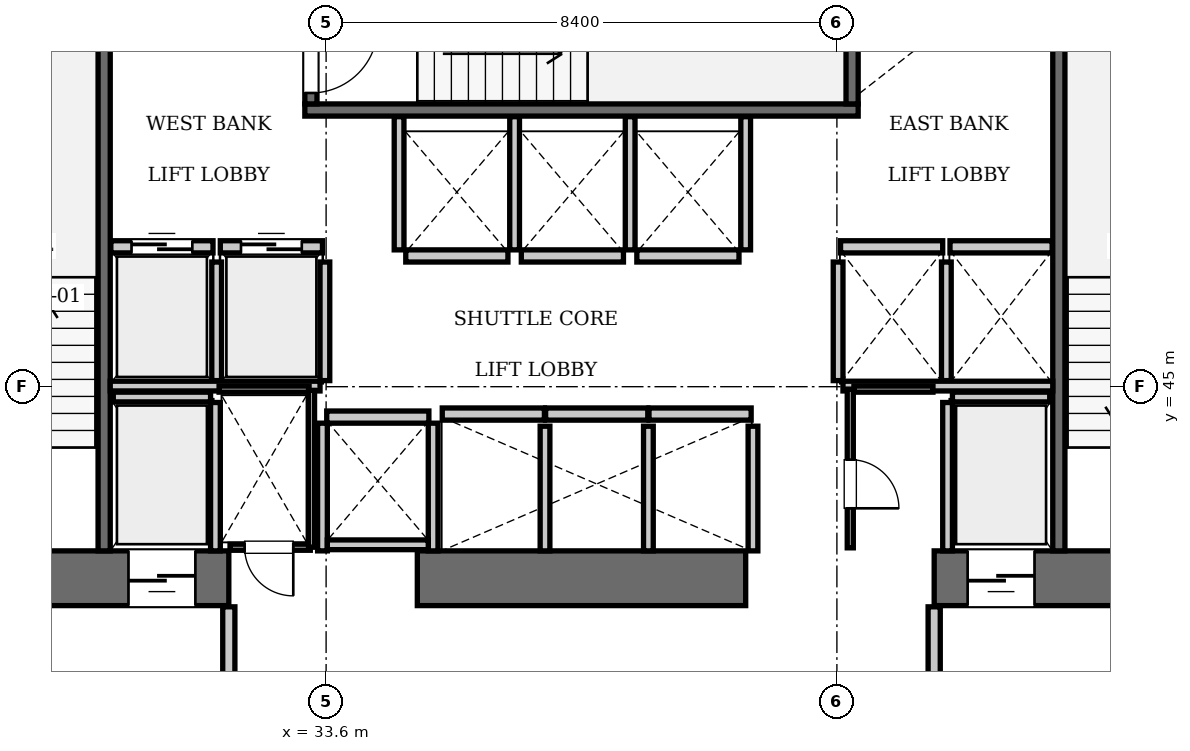
"""IFC4 building model, lengths in metres.
Left out: names, types, materials, properties, quantities, classifications, styles, units other than length and angle.
Written with IfcOpenShell. Run it as: python <this file> out.ifc"""

import sys

from ifc_helpers import new_model, si_unit, direction, frame, frame_2d, origin, place, context, subcontext, project, spatial, rectangle, extrude, element, fill, save


model = new_model("IFC4")
c1 = context("Model", 3, precision=1e-05, world=origin(), true_north=direction((0.0, 1.0)))
c2 = subcontext(c1, "Body", "Model", "MODEL_VIEW")
j1 = project(units=[si_unit("LENGTHUNIT", "METRE"), si_unit("PLANEANGLEUNIT", "RADIAN")], contexts=[c1])
p1 = place(None, origin())
s1 = spatial("IfcSite", under=j1, at=p1, CompositionType="ELEMENT")
p2 = place(p1, origin())
s2 = spatial("IfcBuilding", under=s1, at=p2, CompositionType="ELEMENT")
p3 = place(p2, frame((0.0, 0.0, 57.75)))
s3 = spatial("IfcBuildingStorey", under=s2, at=p3, CompositionType="ELEMENT", Elevation=57.75)
p4 = place(p3, frame((25.2, 41.85, 0.0), z_axis=(0.0, 0.0, 1.0), x_axis=(1.0, 0.0, 0.0)))
e1 = element("IfcWall", 1, at=p4, inside=s3, PredefinedType="SHEAR", context=c2, shape_type="SweptSolid", body=[
    extrude(rectangle(XDim=6.8, YDim=0.9, at=frame_2d((3.4, 0.0))), origin(), (0.0, 0.0, 1.0), 3.85),
])
p5 = place(p4, frame((1.65, 0.0, 0.0)))
e2 = element("IfcOpeningElement", 2, at=p5, cuts=e1, PredefinedType="OPENING", context=c2, shape_type="SweptSolid", body=[
    extrude(rectangle(XDim=1.15, YDim=2.15, at=frame_2d((0.575, 1.075))), frame((0.0, 0.46, 0.0), z_axis=(0.0, -1.0, 0.0), x_axis=(1.0, 0.0, 0.0)), (0.0, 0.0, 1.0), 0.92),
])
p6 = place(p4, frame((5.15, 0.0, 0.0)))
e3 = element("IfcOpeningElement", 3, at=p6, cuts=e1, PredefinedType="OPENING", context=c2, shape_type="SweptSolid", body=[
    extrude(rectangle(XDim=1.1, YDim=2.2, at=frame_2d((0.55, 1.1))), frame((0.0, 0.46, 0.0), z_axis=(0.0, -1.0, 0.0), x_axis=(1.0, 0.0, 0.0)), (0.0, 0.0, 1.0), 0.92),
])
p7 = place(p3, frame((35.1, 41.85, 0.0), z_axis=(0.0, 0.0, 1.0), x_axis=(1.0, 0.0, 0.0)))
e4 = element("IfcWall", 4, at=p7, inside=s3, PredefinedType="SHEAR", context=c2, shape_type="SweptSolid", body=[
    extrude(rectangle(XDim=5.4, YDim=0.9, at=frame_2d((2.7, 0.0))), origin(), (0.0, 0.0, 1.0), 3.85),
])
p8 = place(p3, frame((43.6, 41.85, 0.0), z_axis=(0.0, 0.0, 1.0), x_axis=(1.0, 0.0, 0.0)))
e5 = element("IfcWall", 5, at=p8, inside=s3, PredefinedType="SHEAR", context=c2, shape_type="SweptSolid", body=[
    extrude(rectangle(XDim=6.8, YDim=0.9, at=frame_2d((3.4, 0.0))), origin(), (0.0, 0.0, 1.0), 3.85),
])
p9 = place(p8, frame((3.9, 0.0, 0.0)))
e6 = element("IfcOpeningElement", 6, at=p9, cuts=e5, PredefinedType="OPENING", context=c2, shape_type="SweptSolid", body=[
    extrude(rectangle(XDim=1.15, YDim=2.15, at=frame_2d((0.575, 1.075))), frame((0.0, 0.46, 0.0), z_axis=(0.0, -1.0, 0.0), x_axis=(1.0, 0.0, 0.0)), (0.0, 0.0, 1.0), 0.92),
])
p10 = place(p8, frame((0.55, 0.0, 0.0)))
e7 = element("IfcOpeningElement", 7, at=p10, cuts=e5, PredefinedType="OPENING", context=c2, shape_type="SweptSolid", body=[
    extrude(rectangle(XDim=1.1, YDim=2.2, at=frame_2d((0.55, 1.1))), frame((0.0, 0.46, 0.0), z_axis=(0.0, -1.0, 0.0), x_axis=(1.0, 0.0, 0.0)), (0.0, 0.0, 1.0), 0.92),
])
p11 = place(p3, frame((29.95, 42.3, 0.0), z_axis=(0.0, 0.0, 1.0), x_axis=(0.0, 1.0, 0.0)))
e8 = element("IfcWall", 8, at=p11, inside=s3, PredefinedType="SOLIDWALL", context=c2, shape_type="SweptSolid", body=[
    extrude(rectangle(XDim=8.85, YDim=0.2, at=frame_2d((4.425, 0.0))), origin(), (0.0, 0.0, 1.0), 3.61),
])
p12 = place(p3, frame((33.25, 49.55, 0.0), z_axis=(0.0, 0.0, 1.0), x_axis=(1.0, 0.0, 0.0)))
e9 = element("IfcWall", 9, at=p12, inside=s3, PredefinedType="SOLIDWALL", context=c2, shape_type="SweptSolid", body=[
    extrude(rectangle(XDim=9.1, YDim=0.2, at=frame_2d((4.55, 0.0))), origin(), (0.0, 0.0, 1.0), 3.61),
])
p13 = place(p3, frame((42.25, 49.65, 0.0), z_axis=(0.0, 0.0, 1.0), x_axis=(0.0, 1.0, 0.0)))
e10 = element("IfcWall", 10, at=p13, inside=s3, PredefinedType="SOLIDWALL", context=c2, shape_type="SweptSolid", body=[
    extrude(rectangle(XDim=3.45, YDim=0.2, at=frame_2d((1.725, 0.0))), origin(), (0.0, 0.0, 1.0), 3.61),
])
p14 = place(p3, frame((33.35, 49.65, 0.0), z_axis=(0.0, 0.0, 1.0), x_axis=(0.0, 1.0, 0.0)))
e11 = element("IfcWall", 11, at=p14, inside=s3, PredefinedType="SOLIDWALL", context=c2, shape_type="SweptSolid", body=[
    extrude(rectangle(XDim=3.45, YDim=0.2, at=frame_2d((1.725, 0.0))), origin(), (0.0, 0.0, 1.0), 3.61),
])
p15 = place(p14, frame((0.18, 0.0, 0.0)))
e12 = element("IfcOpeningElement", 12, at=p15, cuts=e11, PredefinedType="OPENING", context=c2, shape_type="SweptSolid", body=[
    extrude(rectangle(XDim=1.1, YDim=2.15, at=frame_2d((0.55, 1.075))), frame((0.0, 0.11, 0.0), z_axis=(0.0, -1.0, 0.0), x_axis=(1.0, 0.0, 0.0)), (0.0, 0.0, 1.0), 0.22),
])
p16 = place(p3, frame((45.65, 42.3, 0.0), z_axis=(0.0, 0.0, 1.0), x_axis=(0.0, 1.0, 0.0)))
e13 = element("IfcWall", 13, at=p16, inside=s3, PredefinedType="SOLIDWALL", context=c2, shape_type="SweptSolid", body=[
    extrude(rectangle(XDim=8.85, YDim=0.2, at=frame_2d((4.425, 0.0))), origin(), (0.0, 0.0, 1.0), 3.61),
])
p17 = place(p3, frame((30.06, 47.3, 0.0), z_axis=(0.0, 0.0, 1.0), x_axis=(1.0, 0.0, 0.0)))
e14 = element("IfcWall", 14, at=p17, inside=s3, PredefinedType="SOLIDWALL", context=c2, shape_type="SweptSolid", body=[
    extrude(rectangle(XDim=1.68, YDim=0.2, at=frame_2d((0.84, 0.0))), origin(), (0.0, 0.0, 1.0), 3.61),
])
p18 = place(p17, frame((0.34, 0.0, 0.0)))
e15 = element("IfcOpeningElement", 15, at=p18, cuts=e14, PredefinedType="OPENING", context=c2, shape_type="SweptSolid", body=[
    extrude(rectangle(XDim=1.0, YDim=2.15, at=frame_2d((0.5, 1.075))), frame((0.0, 0.11, 0.0), z_axis=(0.0, -1.0, 0.0), x_axis=(1.0, 0.0, 0.0)), (0.0, 0.0, 1.0), 0.22),
])
p19 = place(p3, frame((31.86, 47.3, 0.0), z_axis=(0.0, 0.0, 1.0), x_axis=(1.0, 0.0, 0.0)))
e16 = element("IfcWall", 16, at=p19, inside=s3, PredefinedType="SOLIDWALL", context=c2, shape_type="SweptSolid", body=[
    extrude(rectangle(XDim=1.68, YDim=0.2, at=frame_2d((0.84, 0.0))), origin(), (0.0, 0.0, 1.0), 3.61),
])
p20 = place(p19, frame((0.34, 0.0, 0.0)))
e17 = element("IfcOpeningElement", 17, at=p20, cuts=e16, PredefinedType="OPENING", context=c2, shape_type="SweptSolid", body=[
    extrude(rectangle(XDim=1.0, YDim=2.15, at=frame_2d((0.5, 1.075))), frame((0.0, 0.11, 0.0), z_axis=(0.0, -1.0, 0.0), x_axis=(1.0, 0.0, 0.0)), (0.0, 0.0, 1.0), 0.22),
])
for number, where, z_axis, x_axis in (
    (18, (42.06, 47.3, 0.0), (0.0, 0.0, 1.0), (1.0, 0.0, 0.0)),
    (19, (43.86, 47.3, 0.0), (0.0, 0.0, 1.0), (1.0, 0.0, 0.0)),
    (20, (35.51, 44.55, 0.0), (0.0, 0.0, 1.0), (1.0, 0.0, 0.0)),
    (21, (37.21, 44.55, 0.0), (0.0, 0.0, 1.0), (1.0, 0.0, 0.0)),
):
    element("IfcWall", number, at=place(p3, frame(where, z_axis=z_axis, x_axis=x_axis)), inside=s3, PredefinedType="SOLIDWALL", context=c2, shape_type="SweptSolid", body=[
        extrude(rectangle(XDim=1.68, YDim=0.2, at=frame_2d((0.84, 0.0))), origin(), (0.0, 0.0, 1.0), 3.61),
    ])
for number, where, z_axis, x_axis in (
    (22, (38.91, 44.55, 0.0), (0.0, 0.0, 1.0), (1.0, 0.0, 0.0)),
    (23, (34.91, 47.15, 0.0), (0.0, 0.0, 1.0), (1.0, 0.0, 0.0)),
):
    element("IfcWall", number, at=place(p3, frame(where, z_axis=z_axis, x_axis=x_axis)), inside=s3, PredefinedType="SOLIDWALL", context=c2, shape_type="SweptSolid", body=[
        extrude(rectangle(XDim=1.68, YDim=0.2, at=frame_2d((0.84, 0.0))), origin(), (0.0, 0.0, 1.0), 3.61),
    ])
for number, where, z_axis, x_axis in (
    (24, (36.81, 47.15, 0.0), (0.0, 0.0, 1.0), (1.0, 0.0, 0.0)),
    (25, (38.71, 47.15, 0.0), (0.0, 0.0, 1.0), (1.0, 0.0, 0.0)),
    (26, (33.61, 44.5, 0.0), (0.0, 0.0, 1.0), (1.0, 0.0, 0.0)),
):
    element("IfcWall", number, at=place(p3, frame(where, z_axis=z_axis, x_axis=x_axis)), inside=s3, PredefinedType="SOLIDWALL", context=c2, shape_type="SweptSolid", body=[
        extrude(rectangle(XDim=1.68, YDim=0.2, at=frame_2d((0.84, 0.0))), origin(), (0.0, 0.0, 1.0), 3.61),
    ])
p21 = place(p3, frame((30.1, 44.83, 0.0), z_axis=(0.0, 0.0, 1.0), x_axis=(1.0, 0.0, 0.0)))
e27 = element("IfcWall", 27, at=p21, inside=s3, PredefinedType="SOLIDWALL", context=c2, shape_type="SweptSolid", body=[
    extrude(rectangle(XDim=1.6, YDim=0.16, at=frame_2d((0.8, 0.0))), origin(), (0.0, 0.0, 1.0), 3.61),
])
p22 = place(p3, frame((31.78, 42.3, 0.0), z_axis=(0.0, 0.0, 1.0), x_axis=(0.0, 1.0, 0.0)))
e28 = element("IfcWall", 28, at=p22, inside=s3, PredefinedType="SOLIDWALL", context=c2, shape_type="SweptSolid", body=[
    extrude(rectangle(XDim=2.44, YDim=0.16, at=frame_2d((1.22, 0.0))), origin(), (0.0, 0.0, 1.0), 3.61),
])
p23 = place(p3, frame((43.9, 44.83, 0.0), z_axis=(0.0, 0.0, 1.0), x_axis=(1.0, 0.0, 0.0)))
e29 = element("IfcWall", 29, at=p23, inside=s3, PredefinedType="SOLIDWALL", context=c2, shape_type="SweptSolid", body=[
    extrude(rectangle(XDim=1.6, YDim=0.16, at=frame_2d((0.8, 0.0))), origin(), (0.0, 0.0, 1.0), 3.61),
])
p24 = place(p3, frame((43.82, 42.3, 0.0), z_axis=(0.0, 0.0, 1.0), x_axis=(0.0, 1.0, 0.0)))
e30 = element("IfcWall", 30, at=p24, inside=s3, PredefinedType="SOLIDWALL", context=c2, shape_type="SweptSolid", body=[
    extrude(rectangle(XDim=2.44, YDim=0.16, at=frame_2d((1.22, 0.0))), origin(), (0.0, 0.0, 1.0), 3.61),
])
for number, where, z_axis, x_axis in (
    (31, (31.8, 45.1, 0.0), (0.0, 0.0, 1.0), (0.0, 1.0, 0.0)),
    (32, (33.58, 45.1, 0.0), (0.0, 0.0, 1.0), (0.0, 1.0, 0.0)),
):
    element("IfcWall", number, at=place(p3, frame(where, z_axis=z_axis, x_axis=x_axis)), inside=s3, PredefinedType="SOLIDWALL", context=c2, shape_type="SweptSolid", body=[
        extrude(rectangle(XDim=1.95, YDim=0.16, at=frame_2d((0.975, 0.0))), origin(), (0.0, 0.0, 1.0), 3.61),
    ])
p25 = place(p3, frame((30.05, 45.01, 0.0), z_axis=(0.0, 0.0, 1.0), x_axis=(1.0, 0.0, 0.0)))
e33 = element("IfcWall", 33, at=p25, inside=s3, PredefinedType="SOLIDWALL", context=c2, shape_type="SweptSolid", body=[
    extrude(rectangle(XDim=3.45, YDim=0.16, at=frame_2d((1.725, 0.0))), origin(), (0.0, 0.0, 1.0), 3.61),
])
for number, where, z_axis, x_axis in (
    (34, (42.02, 45.1, 0.0), (0.0, 0.0, 1.0), (0.0, 1.0, 0.0)),
    (35, (43.8, 45.1, 0.0), (0.0, 0.0, 1.0), (0.0, 1.0, 0.0)),
):
    element("IfcWall", number, at=place(p3, frame(where, z_axis=z_axis, x_axis=x_axis)), inside=s3, PredefinedType="SOLIDWALL", context=c2, shape_type="SweptSolid", body=[
        extrude(rectangle(XDim=1.95, YDim=0.16, at=frame_2d((0.975, 0.0))), origin(), (0.0, 0.0, 1.0), 3.61),
    ])
p26 = place(p3, frame((42.1, 45.01, 0.0), z_axis=(0.0, 0.0, 1.0), x_axis=(1.0, 0.0, 0.0)))
e36 = element("IfcWall", 36, at=p26, inside=s3, PredefinedType="SOLIDWALL", context=c2, shape_type="SweptSolid", body=[
    extrude(rectangle(XDim=3.45, YDim=0.16, at=frame_2d((1.725, 0.0))), origin(), (0.0, 0.0, 1.0), 3.61),
])
for number, where, z_axis, x_axis in (
    (37, (37.2, 42.3, 0.0), (0.0, 0.0, 1.0), (0.0, 1.0, 0.0)),
    (38, (38.9, 42.3, 0.0), (0.0, 0.0, 1.0), (0.0, 1.0, 0.0)),
    (39, (40.62, 42.3, 0.0), (0.0, 0.0, 1.0), (0.0, 1.0, 0.0)),
):
    element("IfcWall", number, at=place(p3, frame(where, z_axis=z_axis, x_axis=x_axis)), inside=s3, PredefinedType="SOLIDWALL", context=c2, shape_type="SweptSolid", body=[
        extrude(rectangle(XDim=2.05, YDim=0.16, at=frame_2d((1.025, 0.0))), origin(), (0.0, 0.0, 1.0), 3.61),
    ])
for number, where, z_axis, x_axis in (
    (40, (34.8, 47.25, 0.0), (0.0, 0.0, 1.0), (0.0, 1.0, 0.0)),
    (41, (36.7, 47.25, 0.0), (0.0, 0.0, 1.0), (0.0, 1.0, 0.0)),
    (42, (38.6, 47.25, 0.0), (0.0, 0.0, 1.0), (0.0, 1.0, 0.0)),
    (43, (40.5, 47.25, 0.0), (0.0, 0.0, 1.0), (0.0, 1.0, 0.0)),
):
    element("IfcWall", number, at=place(p3, frame(where, z_axis=z_axis, x_axis=x_axis)), inside=s3, PredefinedType="SOLIDWALL", context=c2, shape_type="SweptSolid", body=[
        extrude(rectangle(XDim=2.19, YDim=0.16, at=frame_2d((1.095, 0.0))), origin(), (0.0, 0.0, 1.0), 3.61),
    ])
for number, where, z_axis, x_axis in (
    (44, (33.54, 42.3, 0.0), (0.0, 0.0, 1.0), (0.0, 1.0, 0.0)),
    (45, (35.36, 42.3, 0.0), (0.0, 0.0, 1.0), (0.0, 1.0, 0.0)),
):
    element("IfcWall", number, at=place(p3, frame(where, z_axis=z_axis, x_axis=x_axis)), inside=s3, PredefinedType="SOLIDWALL", context=c2, shape_type="SweptSolid", body=[
        extrude(rectangle(XDim=2.1, YDim=0.16, at=frame_2d((1.05, 0.0))), origin(), (0.0, 0.0, 1.0), 3.61),
    ])
p27 = place(p3, frame((33.62, 42.4, 0.0), z_axis=(0.0, 0.0, 1.0), x_axis=(1.0, 0.0, 0.0)))
e46 = element("IfcWall", 46, at=p27, inside=s3, PredefinedType="SOLIDWALL", context=c2, shape_type="SweptSolid", body=[
    extrude(rectangle(XDim=1.66, YDim=0.16, at=frame_2d((0.83, 0.0))), origin(), (0.0, 0.0, 1.0), 3.61),
])
for number, where, z_axis, x_axis in (
    (47, (32.0, 38.31, 0.0), (0.0, 0.0, 1.0), (0.0, 1.0, 0.0)),
    (48, (43.6, 38.31, 0.0), (0.0, 0.0, 1.0), (0.0, 1.0, 0.0)),
):
    element("IfcWall", number, at=place(p3, frame(where, z_axis=z_axis, x_axis=x_axis)), inside=s3, PredefinedType="PARTITIONING", context=c2, shape_type="SweptSolid", body=[
        extrude(rectangle(XDim=3.07, YDim=0.2, at=frame_2d((1.535, 0.0))), origin(), (0.0, 0.0, 1.0), 3.61),
    ])
p28 = place(p3, frame((32.02, 42.36, 0.0), z_axis=(0.0, 0.0, 1.0), x_axis=(1.0, 0.0, 0.0)))
e49 = element("IfcWall", 49, at=p28, inside=s3, PredefinedType="PARTITIONING", context=c2, shape_type="SweptSolid", body=[
    extrude(rectangle(XDim=1.32, YDim=0.1, at=frame_2d((0.66, 0.0))), origin(), (0.0, 0.0, 1.0), 3.61),
])
p29 = place(p28, frame((0.24, 0.0, 0.0)))
e50 = element("IfcOpeningElement", 50, at=p29, cuts=e49, PredefinedType="OPENING", context=c2, shape_type="SweptSolid", body=[
    extrude(rectangle(XDim=0.8, YDim=2.05, at=frame_2d((0.4, 1.025))), frame((0.0, 0.06, 0.0), z_axis=(0.0, -1.0, 0.0), x_axis=(1.0, 0.0, 0.0)), (0.0, 0.0, 1.0), 0.12),
])
p30 = place(p3, frame((31.84, 44.96, 0.0), z_axis=(0.0, 0.0, 1.0), x_axis=(1.0, 0.0, 0.0)))
e51 = element("IfcWall", 51, at=p30, inside=s3, PredefinedType="PARTITIONING", context=c2, shape_type="SweptSolid", body=[
    extrude(rectangle(XDim=1.48, YDim=0.1, at=frame_2d((0.74, 0.0))), origin(), (0.0, 0.0, 1.0), 3.61),
])
p31 = place(p3, frame((33.36, 42.36, 0.0), z_axis=(0.0, 0.0, 1.0), x_axis=(0.0, 1.0, 0.0)))
e52 = element("IfcWall", 52, at=p31, inside=s3, PredefinedType="PARTITIONING", context=c2, shape_type="SweptSolid", body=[
    extrude(rectangle(XDim=2.58, YDim=0.1, at=frame_2d((1.29, 0.0))), origin(), (0.0, 0.0, 1.0), 3.61),
])
p32 = place(p3, frame((42.22, 42.35, 0.0), z_axis=(0.0, 0.0, 1.0), x_axis=(0.0, 1.0, 0.0)))
e53 = element("IfcWall", 53, at=p32, inside=s3, PredefinedType="PARTITIONING", context=c2, shape_type="SweptSolid", body=[
    extrude(rectangle(XDim=2.61, YDim=0.1, at=frame_2d((1.305, 0.0))), origin(), (0.0, 0.0, 1.0), 3.61),
])
p33 = place(p32, frame((0.65, 0.0, 0.0)))
e54 = element("IfcOpeningElement", 54, at=p33, cuts=e53, PredefinedType="OPENING", context=c2, shape_type="SweptSolid", body=[
    extrude(rectangle(XDim=0.8, YDim=2.05, at=frame_2d((0.4, 1.025))), frame((0.0, 0.06, 0.0), z_axis=(0.0, -1.0, 0.0), x_axis=(1.0, 0.0, 0.0)), (0.0, 0.0, 1.0), 0.12),
])
p34 = place(p3, frame((42.28, 44.96, 0.0), z_axis=(0.0, 0.0, 1.0), x_axis=(1.0, 0.0, 0.0)))
e55 = element("IfcWall", 55, at=p34, inside=s3, PredefinedType="PARTITIONING", context=c2, shape_type="SweptSolid", body=[
    extrude(rectangle(XDim=1.3, YDim=0.1, at=frame_2d((0.65, 0.0))), origin(), (0.0, 0.0, 1.0), 3.61),
])
p35 = place(p15, frame((1.1, 0.0, 0.0), z_axis=(0.0, 0.0, 1.0), x_axis=(-1.0, 0.0, 0.0)))
e56 = element("IfcDoor", 56, at=p35, inside=s3, OperationType="SINGLE_SWING_LEFT", PredefinedType="DOOR", context=c2, shape_type="SweptSolid", body=[
    extrude(rectangle(XDim=1.1, YDim=2.15, at=frame_2d((0.55, 1.075))), frame((0.0, 0.025, 0.0), z_axis=(0.0, -1.0, 0.0), x_axis=(1.0, 0.0, 0.0)), (0.0, 0.0, 1.0), 0.05),
])
fill(e12, e56)
p36 = place(p18, origin())
e57 = element("IfcDoor", 57, at=p36, inside=s3, OperationType="SLIDING_TO_LEFT", PredefinedType="DOOR", context=c2, shape_type="SweptSolid", body=[
    extrude(rectangle(XDim=1.0, YDim=2.15, at=frame_2d((0.5, 1.075))), frame((0.0, 0.025, 0.0), z_axis=(0.0, -1.0, 0.0), x_axis=(1.0, 0.0, 0.0)), (0.0, 0.0, 1.0), 0.05),
])
fill(e15, e57)
p37 = place(p20, origin())
e58 = element("IfcDoor", 58, at=p37, inside=s3, OperationType="SLIDING_TO_LEFT", PredefinedType="DOOR", context=c2, shape_type="SweptSolid", body=[
    extrude(rectangle(XDim=1.0, YDim=2.15, at=frame_2d((0.5, 1.075))), frame((0.0, 0.025, 0.0), z_axis=(0.0, -1.0, 0.0), x_axis=(1.0, 0.0, 0.0)), (0.0, 0.0, 1.0), 0.05),
])
fill(e17, e58)
p38 = place(p6, frame((1.1, 0.0, 0.0), z_axis=(0.0, 0.0, 1.0), x_axis=(-1.0, 0.0, 0.0)))
e59 = element("IfcDoor", 59, at=p38, inside=s3, OperationType="SLIDING_TO_LEFT", PredefinedType="DOOR", context=c2, shape_type="SweptSolid", body=[
    extrude(rectangle(XDim=1.1, YDim=2.2, at=frame_2d((0.55, 1.1))), frame((0.0, 0.025, 0.0), z_axis=(0.0, -1.0, 0.0), x_axis=(1.0, 0.0, 0.0)), (0.0, 0.0, 1.0), 0.05),
])
fill(e3, e59)
p39 = place(p10, frame((1.1, 0.0, 0.0), z_axis=(0.0, 0.0, 1.0), x_axis=(-1.0, 0.0, 0.0)))
e60 = element("IfcDoor", 60, at=p39, inside=s3, OperationType="SLIDING_TO_LEFT", PredefinedType="DOOR", context=c2, shape_type="SweptSolid", body=[
    extrude(rectangle(XDim=1.1, YDim=2.2, at=frame_2d((0.55, 1.1))), frame((0.0, 0.025, 0.0), z_axis=(0.0, -1.0, 0.0), x_axis=(1.0, 0.0, 0.0)), (0.0, 0.0, 1.0), 0.05),
])
fill(e7, e60)
p40 = place(p29, frame((0.8, 0.0, 0.0), z_axis=(0.0, 0.0, 1.0), x_axis=(-1.0, 0.0, 0.0)))
e61 = element("IfcDoor", 61, at=p40, inside=s3, OperationType="SINGLE_SWING_LEFT", PredefinedType="DOOR", context=c2, shape_type="SweptSolid", body=[
    extrude(rectangle(XDim=0.8, YDim=2.05, at=frame_2d((0.4, 1.025))), frame((0.0, 0.025, 0.0), z_axis=(0.0, -1.0, 0.0), x_axis=(1.0, 0.0, 0.0)), (0.0, 0.0, 1.0), 0.05),
])
fill(e50, e61)
p41 = place(p33, frame((0.8, 0.0, 0.0), z_axis=(0.0, 0.0, 1.0), x_axis=(-1.0, 0.0, 0.0)))
e62 = element("IfcDoor", 62, at=p41, inside=s3, OperationType="SINGLE_SWING_RIGHT", PredefinedType="DOOR", context=c2, shape_type="SweptSolid", body=[
    extrude(rectangle(XDim=0.8, YDim=2.05, at=frame_2d((0.4, 1.025))), frame((0.0, 0.025, 0.0), z_axis=(0.0, -1.0, 0.0), x_axis=(1.0, 0.0, 0.0)), (0.0, 0.0, 1.0), 0.05),
])
fill(e54, e62)
save(model, sys.argv[1])
